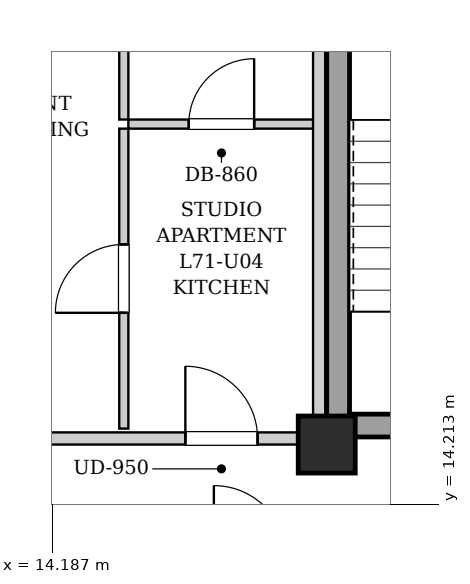
"""IFC4 building model, lengths in metres.
Left out: names, types, materials, properties, quantities, classifications, styles, units other than length and angle.
Written with IfcOpenShell. Run it as: python <this file> out.ifc"""

import sys

from ifc_helpers import new_model, si_unit, direction, frame, frame_2d, origin, origin_2d, place, context, subcontext, project, spatial, rectangle, extrude, element, fill, save


model = new_model("IFC4")
c1 = context("Model", 3, precision=1e-05, world=origin(), true_north=direction((0.0, 1.0)))
c2 = subcontext(c1, "Body", "Model", "MODEL_VIEW")
j1 = project(units=[si_unit("LENGTHUNIT", "METRE"), si_unit("PLANEANGLEUNIT", "RADIAN")], contexts=[c1])
p1 = place(None, origin())
s1 = spatial("IfcSite", under=j1, at=p1, CompositionType="ELEMENT")
p2 = place(p1, origin())
s2 = spatial("IfcBuilding", under=s1, at=p2, CompositionType="ELEMENT")
p3 = place(p2, frame((0.0, 0.0, 244.5)))
s3 = spatial("IfcBuildingStorey", under=s2, at=p3, CompositionType="ELEMENT", Elevation=244.5)
p4 = place(p3, frame((17.8, 15.0, 0.0), z_axis=(0.0, 0.0, 1.0), x_axis=(1.0, 0.0, 0.0)))
e1 = element("IfcColumn", 1, at=p4, inside=s3, PredefinedType="COLUMN", context=c2, shape_type="SweptSolid", body=[
    extrude(rectangle(XDim=0.75, YDim=0.75, at=origin_2d()), origin(), (0.0, 0.0, 1.0), 3.4),
])
p5 = place(p3, frame((17.95, 15.1, 0.0), z_axis=(0.0, 0.0, 1.0), x_axis=(0.0, 1.0, 0.0)))
e2 = element("IfcWall", 2, at=p5, inside=s3, PredefinedType="SHEAR", context=c2, shape_type="SweptSolid", body=[
    extrude(rectangle(XDim=9.0, YDim=0.3, at=frame_2d((4.5, 0.0))), origin(), (0.0, 0.0, 1.0), 3.14),
])
p6 = place(p3, frame((18.1, 15.25, 0.0), z_axis=(0.0, 0.0, 1.0), x_axis=(1.0, 0.0, 0.0)))
e3 = element("IfcWall", 3, at=p6, inside=s3, PredefinedType="SHEAR", context=c2, shape_type="SweptSolid", body=[
    extrude(rectangle(XDim=2.85, YDim=0.3, at=frame_2d((1.425, 0.0))), origin(), (0.0, 0.0, 1.0), 3.14),
])
p7 = place(p6, frame((0.86, 0.0, 0.0)))
e4 = element("IfcOpeningElement", 4, at=p7, cuts=e3, PredefinedType="OPENING", context=c2, shape_type="SweptSolid", body=[
    extrude(rectangle(XDim=1.1, YDim=2.05, at=frame_2d((0.55, 1.025))), frame((0.0, 0.16, 0.0), z_axis=(0.0, -1.0, 0.0), x_axis=(1.0, 0.0, 0.0)), (0.0, 0.0, 1.0), 0.32),
])
p8 = place(p3, frame((10.88, 15.08, 0.0), z_axis=(0.0, 0.0, 1.0), x_axis=(1.0, 0.0, 0.0)))
e5 = element("IfcWall", 5, at=p8, inside=s3, PredefinedType="PARTITIONING", context=c2, shape_type="SweptSolid", body=[
    extrude(rectangle(XDim=6.88, YDim=0.16, at=frame_2d((3.44, 0.0))), origin(), (0.0, 0.0, 1.0), 2.668),
])
p9 = place(p8, frame((5.06, 0.0, 0.0)))
e6 = element("IfcOpeningElement", 6, at=p9, cuts=e5, PredefinedType="OPENING", context=c2, shape_type="SweptSolid", body=[
    extrude(rectangle(XDim=0.95, YDim=2.1, at=frame_2d((0.475, 1.05))), frame((0.0, 0.09, 0.0), z_axis=(0.0, -1.0, 0.0), x_axis=(1.0, 0.0, 0.0)), (0.0, 0.0, 1.0), 0.18),
])
p10 = place(p3, frame((15.19, 19.216, 0.0), z_axis=(0.0, 0.0, 1.0), x_axis=(1.0, 0.0, 0.0)))
e7 = element("IfcWall", 7, at=p10, inside=s3, PredefinedType="PARTITIONING", context=c2, shape_type="SweptSolid", body=[
    extrude(rectangle(XDim=2.45, YDim=0.12, at=frame_2d((1.225, 0.0))), origin(), (0.0, 0.0, 1.0), 3.14),
])
p11 = place(p10, frame((0.795, 0.0, 0.0)))
e8 = element("IfcOpeningElement", 8, at=p11, cuts=e7, PredefinedType="OPENING", context=c2, shape_type="SweptSolid", body=[
    extrude(rectangle(XDim=0.86, YDim=2.05, at=frame_2d((0.43, 1.025))), frame((0.0, 0.07, 0.0), z_axis=(0.0, -1.0, 0.0), x_axis=(1.0, 0.0, 0.0)), (0.0, 0.0, 1.0), 0.14),
])
p12 = place(p3, frame((15.13, 19.276, 0.0), z_axis=(0.0, 0.0, 1.0), x_axis=(0.0, 1.0, 0.0)))
e9 = element("IfcWall", 9, at=p12, inside=s3, PredefinedType="PARTITIONING", context=c2, shape_type="SweptSolid", body=[
    extrude(rectangle(XDim=1.85, YDim=0.12, at=frame_2d((0.925, 0.0))), origin(), (0.0, 0.0, 1.0), 3.14),
])
p13 = place(p3, frame((15.13, 15.21, 0.0), z_axis=(0.0, 0.0, 1.0), x_axis=(0.0, 1.0, 0.0)))
e10 = element("IfcWall", 10, at=p13, inside=s3, PredefinedType="PARTITIONING", context=c2, shape_type="SweptSolid", body=[
    extrude(rectangle(XDim=3.946, YDim=0.12, at=frame_2d((1.973, 0.0))), origin(), (0.0, 0.0, 1.0), 3.14),
])
p14 = place(p13, frame((1.523, 0.0, 0.0)))
e11 = element("IfcOpeningElement", 11, at=p14, cuts=e10, PredefinedType="OPENING", context=c2, shape_type="SweptSolid", body=[
    extrude(rectangle(XDim=0.9, YDim=2.05, at=frame_2d((0.45, 1.025))), frame((0.0, 0.07, 0.0), z_axis=(0.0, -1.0, 0.0), x_axis=(1.0, 0.0, 0.0)), (0.0, 0.0, 1.0), 0.14),
])
p15 = place(p3, frame((17.7, 15.02, 0.0), z_axis=(0.0, 0.0, 1.0), x_axis=(0.0, 1.0, 0.0)))
e12 = element("IfcWall", 12, at=p15, inside=s3, PredefinedType="PARTITIONING", context=c2, shape_type="SweptSolid", body=[
    extrude(rectangle(XDim=13.98, YDim=0.16, at=frame_2d((6.99, 0.0))), origin(), (0.0, 0.0, 1.0), 3.14),
])
p16 = place(p9, origin())
e13 = element("IfcDoor", 13, at=p16, inside=s3, OperationType="SINGLE_SWING_LEFT", PredefinedType="DOOR", context=c2, shape_type="SweptSolid", body=[
    extrude(rectangle(XDim=0.95, YDim=2.1, at=frame_2d((0.475, 1.05))), frame((0.0, 0.025, 0.0), z_axis=(0.0, -1.0, 0.0), x_axis=(1.0, 0.0, 0.0)), (0.0, 0.0, 1.0), 0.05),
])
fill(e6, e13)
p17 = place(p11, origin())
e14 = element("IfcDoor", 14, at=p17, inside=s3, OperationType="SINGLE_SWING_RIGHT", PredefinedType="DOOR", context=c2, shape_type="SweptSolid", body=[
    extrude(rectangle(XDim=0.86, YDim=2.05, at=frame_2d((0.43, 1.025))), frame((0.0, 0.025, 0.0), z_axis=(0.0, -1.0, 0.0), x_axis=(1.0, 0.0, 0.0)), (0.0, 0.0, 1.0), 0.05),
])
fill(e8, e14)
p18 = place(p14, origin())
e15 = element("IfcDoor", 15, at=p18, inside=s3, OperationType="SINGLE_SWING_LEFT", PredefinedType="DOOR", context=c2, shape_type="SweptSolid", body=[
    extrude(rectangle(XDim=0.9, YDim=2.05, at=frame_2d((0.45, 1.025))), frame((0.0, 0.025, 0.0), z_axis=(0.0, -1.0, 0.0), x_axis=(1.0, 0.0, 0.0)), (0.0, 0.0, 1.0), 0.05),
])
fill(e11, e15)
save(model, sys.argv[1])
